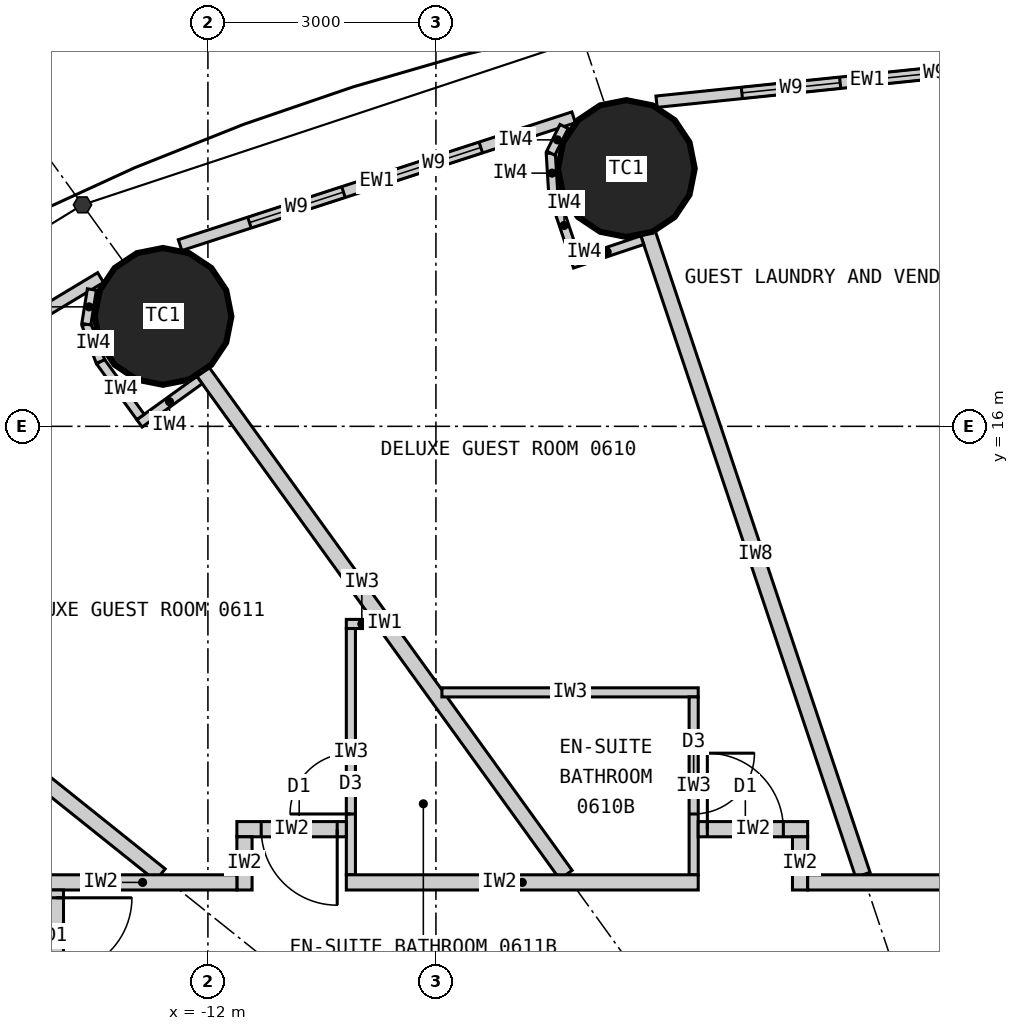
"""IFC4 building model, lengths in metres.
Left out: names, types, materials, properties, quantities, classifications, styles, units other than length and angle.
Written with IfcOpenShell. Run it as: python <this file> out.ifc"""

import sys

from ifc_helpers import new_model, si_unit, direction, frame, frame_2d, origin, origin_2d, place, context, subcontext, project, spatial, rectangle, circle, extrude, element, fill, save


model = new_model("IFC4")
c1 = context("Model", 3, precision=1e-05, world=origin(), true_north=direction((0.0, 1.0)))
c2 = subcontext(c1, "Body", "Model", "MODEL_VIEW")
j1 = project(units=[si_unit("LENGTHUNIT", "METRE"), si_unit("PLANEANGLEUNIT", "RADIAN")], contexts=[c1])
p1 = place(None, origin())
s1 = spatial("IfcSite", under=j1, at=p1, CompositionType="ELEMENT")
p2 = place(p1, origin())
s2 = spatial("IfcBuilding", under=s1, at=p2, CompositionType="ELEMENT")
p3 = place(p2, frame((0.0, 0.0, 32.7)))
s3 = spatial("IfcBuildingStorey", under=s2, at=p3, CompositionType="ELEMENT", Elevation=32.7)
for number, where, z_axis, x_axis in (
    (1, (-6.495, 19.391, 0.0), (0.0, 0.0, 1.0), (1.0, 0.0, 0.0)),
    (2, (-12.591, 17.447, 0.0), (0.0, 0.0, 1.0), (1.0, 0.0, 0.0)),
):
    element("IfcColumn", number, at=place(p3, frame(where, z_axis=z_axis, x_axis=x_axis)), inside=s3, PredefinedType="COLUMN", context=c2, shape_type="SweptSolid", body=[
        extrude(circle(Radius=0.9, at=origin_2d()), origin(), (0.0, 0.0, 1.0), 3.3),
    ])
p4 = place(p3, frame((-0.551, 20.843, 0.0), z_axis=(0.0, 0.0, 1.0), x_axis=(-0.994723735084, -0.102589915983, 0.0)))
e3 = element("IfcWall", 3, at=p4, inside=s3, PredefinedType="ELEMENTEDWALL", context=c2, shape_type="SweptSolid", body=[
    extrude(rectangle(XDim=5.576, YDim=0.15, at=frame_2d((2.788, 0.0))), origin(), (0.0, 0.0, 1.0), 3.12),
])
p5 = place(p4, frame((1.247, 0.0, 0.9)))
e4 = element("IfcOpeningElement", 4, at=p5, cuts=e3, PredefinedType="OPENING", context=c2, shape_type="SweptSolid", body=[
    extrude(rectangle(XDim=1.3, YDim=1.9, at=frame_2d((0.65, 0.95))), frame((0.0, 0.085, 0.0), z_axis=(0.0, -1.0, 0.0), x_axis=(1.0, 0.0, 0.0)), (0.0, 0.0, 1.0), 0.17),
])
p6 = place(p4, frame((3.147, 0.0, 0.9)))
e5 = element("IfcOpeningElement", 5, at=p6, cuts=e3, PredefinedType="OPENING", context=c2, shape_type="SweptSolid", body=[
    extrude(rectangle(XDim=1.3, YDim=1.9, at=frame_2d((0.65, 0.95))), frame((0.0, 0.085, 0.0), z_axis=(0.0, -1.0, 0.0), x_axis=(1.0, 0.0, 0.0)), (0.0, 0.0, 1.0), 0.17),
])
p7 = place(p3, frame((-7.188, 20.065, 0.0), z_axis=(0.0, 0.0, 1.0), x_axis=(-0.951138486029, -0.308764603532, 0.0)))
e6 = element("IfcWall", 6, at=p7, inside=s3, PredefinedType="ELEMENTEDWALL", context=c2, shape_type="SweptSolid", body=[
    extrude(rectangle(XDim=5.444, YDim=0.15, at=frame_2d((2.722, 0.0))), origin(), (0.0, 0.0, 1.0), 3.12),
])
p8 = place(p7, frame((1.284, 0.0, 0.9)))
e7 = element("IfcOpeningElement", 7, at=p8, cuts=e6, PredefinedType="OPENING", context=c2, shape_type="SweptSolid", body=[
    extrude(rectangle(XDim=1.3, YDim=1.9, at=frame_2d((0.65, 0.95))), frame((0.0, 0.085, 0.0), z_axis=(0.0, -1.0, 0.0), x_axis=(1.0, 0.0, 0.0)), (0.0, 0.0, 1.0), 0.17),
])
p9 = place(p7, frame((3.184, 0.0, 0.9)))
e8 = element("IfcOpeningElement", 8, at=p9, cuts=e6, PredefinedType="OPENING", context=c2, shape_type="SweptSolid", body=[
    extrude(rectangle(XDim=1.3, YDim=1.9, at=frame_2d((0.65, 0.95))), frame((0.0, 0.085, 0.0), z_axis=(0.0, -1.0, 0.0), x_axis=(1.0, 0.0, 0.0)), (0.0, 0.0, 1.0), 0.17),
])
p10 = place(p3, frame((-13.412, 17.957, 0.0), z_axis=(0.0, 0.0, 1.0), x_axis=(-0.856958191554, -0.515385931054, 0.0)))
e9 = element("IfcWall", 9, at=p10, inside=s3, PredefinedType="ELEMENTEDWALL", context=c2, shape_type="SweptSolid", body=[
    extrude(rectangle(XDim=5.201, YDim=0.15, at=frame_2d((2.601, 0.0))), origin(), (0.0, 0.0, 1.0), 3.12),
])
p11 = place(p10, frame((1.225, 0.0, 0.9)))
e10 = element("IfcOpeningElement", 10, at=p11, cuts=e9, PredefinedType="OPENING", context=c2, shape_type="SweptSolid", body=[
    extrude(rectangle(XDim=1.3, YDim=1.9, at=frame_2d((0.65, 0.95))), frame((0.0, 0.085, 0.0), z_axis=(0.0, -1.0, 0.0), x_axis=(1.0, 0.0, 0.0)), (0.0, 0.0, 1.0), 0.17),
])
p12 = place(p10, frame((3.125, 0.0, 0.9)))
e11 = element("IfcOpeningElement", 11, at=p12, cuts=e9, PredefinedType="OPENING", context=c2, shape_type="SweptSolid", body=[
    extrude(rectangle(XDim=1.3, YDim=1.9, at=frame_2d((0.65, 0.95))), frame((0.0, 0.085, 0.0), z_axis=(0.0, -1.0, 0.0), x_axis=(1.0, 0.0, 0.0)), (0.0, 0.0, 1.0), 0.17),
])
p13 = place(p3, frame((-3.383, 10.1, 0.0), z_axis=(0.0, 0.0, 1.0), x_axis=(-0.317593727596, 0.948226884344, 0.0)))
e12 = element("IfcWall", 12, at=p13, inside=s3, PredefinedType="PARTITIONING", context=c2, shape_type="SweptSolid", body=[
    extrude(rectangle(XDim=8.899, YDim=0.2, at=frame_2d((4.449, 0.0))), origin(), (0.0, 0.0, 1.0), 2.32),
])
p14 = place(p3, frame((-7.289, 10.1, 0.0), z_axis=(0.0, 0.0, 1.0), x_axis=(-0.585216319319, 0.810877216108, 0.0)))
e13 = element("IfcWall", 13, at=p14, inside=s3, PredefinedType="PARTITIONING", context=c2, shape_type="SweptSolid", body=[
    extrude(rectangle(XDim=8.16, YDim=0.2, at=frame_2d((4.08, 0.0))), origin(), (0.0, 0.0, 1.0), 2.32),
])
p15 = place(p3, frame((-12.625, 10.1, 0.0), z_axis=(0.0, 0.0, 1.0), x_axis=(-0.780872884676, 0.624689953479, 0.0)))
e14 = element("IfcWall", 14, at=p15, inside=s3, PredefinedType="PARTITIONING", context=c2, shape_type="SweptSolid", body=[
    extrude(rectangle(XDim=5.845, YDim=0.2, at=frame_2d((2.922, 0.0))), origin(), (0.0, 0.0, 1.0), 2.32),
])
p16 = place(p3, frame((-8.921, 12.5, 0.0), z_axis=(0.0, 0.0, 1.0), x_axis=(1.0, 0.0, 0.0)))
e15 = element("IfcWall", 15, at=p16, inside=s3, PredefinedType="PARTITIONING", context=c2, shape_type="SweptSolid", body=[
    extrude(rectangle(XDim=3.372, YDim=0.12, at=frame_2d((1.686, 0.0))), origin(), (0.0, 0.0, 1.0), 3.12),
])
p17 = place(p3, frame((-5.609, 10.1, 0.0), z_axis=(0.0, 0.0, 1.0), x_axis=(0.0, 1.0, 0.0)))
e16 = element("IfcWall", 16, at=p17, inside=s3, PredefinedType="PARTITIONING", context=c2, shape_type="SweptSolid", body=[
    extrude(rectangle(XDim=2.34, YDim=0.12, at=frame_2d((1.17, 0.0))), origin(), (0.0, 0.0, 1.0), 3.12),
])
p18 = place(p17, frame((0.8, 0.0, 0.0)))
e17 = element("IfcOpeningElement", 17, at=p18, cuts=e16, PredefinedType="OPENING", context=c2, shape_type="SweptSolid", body=[
    extrude(rectangle(XDim=0.8, YDim=2.1, at=frame_2d((0.4, 1.05))), frame((0.0, 0.07, 0.0), z_axis=(0.0, -1.0, 0.0), x_axis=(1.0, 0.0, 0.0)), (0.0, 0.0, 1.0), 0.14),
])
p19 = place(p3, frame((-9.771, 13.4, 0.0), z_axis=(0.0, 0.0, 1.0), x_axis=(-1.0, 0.0, 0.0)))
e18 = element("IfcWall", 18, at=p19, inside=s3, PredefinedType="PARTITIONING", context=c2, shape_type="SweptSolid", body=[
    extrude(rectangle(XDim=0.408, YDim=0.12, at=frame_2d((0.204, 0.0))), origin(), (0.0, 0.0, 1.0), 3.12),
])
p20 = place(p3, frame((-10.119, 10.1, 0.0), z_axis=(0.0, 0.0, 1.0), x_axis=(0.0, 1.0, 0.0)))
e19 = element("IfcWall", 19, at=p20, inside=s3, PredefinedType="PARTITIONING", context=c2, shape_type="SweptSolid", body=[
    extrude(rectangle(XDim=3.24, YDim=0.12, at=frame_2d((1.62, 0.0))), origin(), (0.0, 0.0, 1.0), 3.12),
])
p21 = place(p20, frame((0.8, 0.0, 0.0)))
e20 = element("IfcOpeningElement", 20, at=p21, cuts=e19, PredefinedType="OPENING", context=c2, shape_type="SweptSolid", body=[
    extrude(rectangle(XDim=0.8, YDim=2.1, at=frame_2d((0.4, 1.05))), frame((0.0, 0.07, 0.0), z_axis=(0.0, -1.0, 0.0), x_axis=(1.0, 0.0, 0.0)), (0.0, 0.0, 1.0), 0.14),
])
p22 = place(p3, frame((-5.549, 10.7, 0.0), z_axis=(0.0, 0.0, 1.0), x_axis=(1.0, 0.0, 0.0)))
e21 = element("IfcWall", 21, at=p22, inside=s3, PredefinedType="PARTITIONING", context=c2, shape_type="SweptSolid", body=[
    extrude(rectangle(XDim=1.44, YDim=0.2, at=frame_2d((0.72, 0.0))), origin(), (0.0, 0.0, 1.0), 3.12),
])
p23 = place(p22, frame((0.12, 0.0, 0.0)))
e22 = element("IfcOpeningElement", 22, at=p23, cuts=e21, PredefinedType="OPENING", context=c2, shape_type="SweptSolid", body=[
    extrude(rectangle(XDim=1.0, YDim=2.2, at=frame_2d((0.5, 1.1))), frame((0.0, 0.11, 0.0), z_axis=(0.0, -1.0, 0.0), x_axis=(1.0, 0.0, 0.0)), (0.0, 0.0, 1.0), 0.22),
])
p24 = place(p3, frame((-4.209, 9.9, 0.0), z_axis=(0.0, 0.0, 1.0), x_axis=(0.0, 1.0, 0.0)))
e23 = element("IfcWall", 23, at=p24, inside=s3, PredefinedType="PARTITIONING", context=c2, shape_type="SweptSolid", body=[
    extrude(rectangle(XDim=0.7, YDim=0.2, at=frame_2d((0.35, 0.0))), origin(), (0.0, 0.0, 1.0), 3.12),
])
p25 = place(p3, frame((-11.619, 10.7, 0.0), z_axis=(0.0, 0.0, 1.0), x_axis=(1.0, 0.0, 0.0)))
e24 = element("IfcWall", 24, at=p25, inside=s3, PredefinedType="PARTITIONING", context=c2, shape_type="SweptSolid", body=[
    extrude(rectangle(XDim=1.44, YDim=0.2, at=frame_2d((0.72, 0.0))), origin(), (0.0, 0.0, 1.0), 3.12),
])
p26 = place(p25, frame((0.32, 0.0, 0.0)))
e25 = element("IfcOpeningElement", 25, at=p26, cuts=e24, PredefinedType="OPENING", context=c2, shape_type="SweptSolid", body=[
    extrude(rectangle(XDim=1.0, YDim=2.2, at=frame_2d((0.5, 1.1))), frame((0.0, 0.11, 0.0), z_axis=(0.0, -1.0, 0.0), x_axis=(1.0, 0.0, 0.0)), (0.0, 0.0, 1.0), 0.22),
])
p27 = place(p3, frame((-11.519, 9.9, 0.0), z_axis=(0.0, 0.0, 1.0), x_axis=(0.0, 1.0, 0.0)))
e26 = element("IfcWall", 26, at=p27, inside=s3, PredefinedType="PARTITIONING", context=c2, shape_type="SweptSolid", body=[
    extrude(rectangle(XDim=0.7, YDim=0.2, at=frame_2d((0.35, 0.0))), origin(), (0.0, 0.0, 1.0), 3.12),
])
p28 = place(p3, frame((-14.1, 10.0, 0.0), z_axis=(0.0, 0.0, 1.0), x_axis=(1.0, 0.0, 0.0)))
e27 = element("IfcWall", 27, at=p28, inside=s3, PredefinedType="PARTITIONING", context=c2, shape_type="SweptSolid", body=[
    extrude(rectangle(XDim=2.481, YDim=0.2, at=frame_2d((1.24, 0.0))), origin(), (0.0, 0.0, 1.0), 3.12),
])
p29 = place(p3, frame((-10.179, 10.0, 0.0), z_axis=(0.0, 0.0, 1.0), x_axis=(1.0, 0.0, 0.0)))
e28 = element("IfcWall", 28, at=p29, inside=s3, PredefinedType="PARTITIONING", context=c2, shape_type="SweptSolid", body=[
    extrude(rectangle(XDim=4.63, YDim=0.2, at=frame_2d((2.315, 0.0))), origin(), (0.0, 0.0, 1.0), 3.12),
])
p30 = place(p3, frame((-4.109, 10.0, 0.0), z_axis=(0.0, 0.0, 1.0), x_axis=(1.0, 0.0, 0.0)))
e29 = element("IfcWall", 29, at=p30, inside=s3, PredefinedType="PARTITIONING", context=c2, shape_type="SweptSolid", body=[
    extrude(rectangle(XDim=4.312, YDim=0.2, at=frame_2d((2.156, 0.0))), origin(), (0.0, 0.0, 1.0), 3.12),
])
p31 = place(p30, frame((2.689, 0.0, 0.0)))
e30 = element("IfcOpeningElement", 30, at=p31, cuts=e29, PredefinedType="OPENING", context=c2, shape_type="SweptSolid", body=[
    extrude(rectangle(XDim=1.0, YDim=2.2, at=frame_2d((0.5, 1.1))), frame((0.0, 0.11, 0.0), z_axis=(0.0, -1.0, 0.0), x_axis=(1.0, 0.0, 0.0)), (0.0, 0.0, 1.0), 0.22),
])
p32 = place(p3, frame((-14.0, 9.9, 0.0), z_axis=(0.0, 0.0, 1.0), x_axis=(0.0, -1.0, 0.0)))
e31 = element("IfcWall", 31, at=p32, inside=s3, PredefinedType="PARTITIONING", context=c2, shape_type="SweptSolid", body=[
    extrude(rectangle(XDim=5.127, YDim=0.2, at=frame_2d((2.564, 0.0))), origin(), (0.0, 0.0, 1.0), 3.12),
])
p33 = place(p32, frame((0.103, 0.0, 0.0)))
e32 = element("IfcOpeningElement", 32, at=p33, cuts=e31, PredefinedType="OPENING", context=c2, shape_type="SweptSolid", body=[
    extrude(rectangle(XDim=1.0, YDim=2.2, at=frame_2d((0.5, 1.1))), frame((0.0, 0.11, 0.0), z_axis=(0.0, -1.0, 0.0), x_axis=(1.0, 0.0, 0.0)), (0.0, 0.0, 1.0), 0.22),
])
p34 = place(p3, frame((-6.285, 18.449, 0.0), z_axis=(0.0, 0.0, 1.0), x_axis=(-0.948281677008, -0.317430088446, 0.0)))
e33 = element("IfcWall", 33, at=p34, inside=s3, PredefinedType="PARTITIONING", context=c2, shape_type="SweptSolid", body=[
    extrude(rectangle(XDim=0.974, YDim=0.12, at=frame_2d((0.487, 0.0))), origin(), (0.0, 0.0, 1.0), 3.12),
])
p35 = place(p3, frame((-7.171, 18.216, 0.0), z_axis=(0.0, 0.0, 1.0), x_axis=(-0.317692409458, 0.94819382669, 0.0)))
e34 = element("IfcWall", 34, at=p35, inside=s3, PredefinedType="PARTITIONING", context=c2, shape_type="SweptSolid", body=[
    extrude(rectangle(XDim=0.9, YDim=0.12, at=frame_2d((0.45, 0.0))), origin(), (0.0, 0.0, 1.0), 3.12),
])
p36 = place(p3, frame((-7.457, 19.069, 0.0), z_axis=(0.0, 0.0, 1.0), x_axis=(-0.061365267648, 0.99811537606, 0.0)))
e35 = element("IfcWall", 35, at=p36, inside=s3, PredefinedType="PARTITIONING", context=c2, shape_type="SweptSolid", body=[
    extrude(rectangle(XDim=0.525, YDim=0.12, at=frame_2d((0.263, 0.0))), origin(), (0.0, 0.0, 1.0), 3.12),
])
p37 = place(p3, frame((-7.489, 19.593, 0.0), z_axis=(0.0, 0.0, 1.0), x_axis=(0.446218959337, 0.89492381817, 0.0)))
e36 = element("IfcWall", 36, at=p37, inside=s3, PredefinedType="PARTITIONING", context=c2, shape_type="SweptSolid", body=[
    extrude(rectangle(XDim=0.393, YDim=0.12, at=frame_2d((0.196, 0.0))), origin(), (0.0, 0.0, 1.0), 3.12),
])
p38 = place(p3, frame((-12.11, 16.609, 0.0), z_axis=(0.0, 0.0, 1.0), x_axis=(-0.810897160646, -0.585188683123, 0.0)))
e37 = element("IfcWall", 37, at=p38, inside=s3, PredefinedType="PARTITIONING", context=c2, shape_type="SweptSolid", body=[
    extrude(rectangle(XDim=0.975, YDim=0.12, at=frame_2d((0.487, 0.0))), origin(), (0.0, 0.0, 1.0), 3.12),
])
p39 = place(p3, frame((-12.887, 16.123, 0.0), z_axis=(0.0, 0.0, 1.0), x_axis=(-0.585054732094, 0.810993810367, 0.0)))
e38 = element("IfcWall", 38, at=p39, inside=s3, PredefinedType="PARTITIONING", context=c2, shape_type="SweptSolid", body=[
    extrude(rectangle(XDim=0.9, YDim=0.12, at=frame_2d((0.45, 0.0))), origin(), (0.0, 0.0, 1.0), 3.12),
])
p40 = place(p3, frame((-13.414, 16.853, 0.0), z_axis=(0.0, 0.0, 1.0), x_axis=(-0.355705277023, 0.934598178844, 0.0)))
e39 = element("IfcWall", 39, at=p40, inside=s3, PredefinedType="PARTITIONING", context=c2, shape_type="SweptSolid", body=[
    extrude(rectangle(XDim=0.525, YDim=0.12, at=frame_2d((0.263, 0.0))), origin(), (0.0, 0.0, 1.0), 3.12),
])
p41 = place(p3, frame((-13.6, 17.344, 0.0), z_axis=(0.0, 0.0, 1.0), x_axis=(0.15994604532, 0.987125758243, 0.0)))
e40 = element("IfcWall", 40, at=p41, inside=s3, PredefinedType="PARTITIONING", context=c2, shape_type="SweptSolid", body=[
    extrude(rectangle(XDim=0.462, YDim=0.12, at=frame_2d((0.231, 0.0))), origin(), (0.0, 0.0, 1.0), 3.12),
])
p42 = place(p5, origin())
e41 = element("IfcWindow", 41, at=p42, inside=s3, PartitioningType="SINGLE_PANEL", PredefinedType="WINDOW", context=c2, shape_type="SweptSolid", body=[
    extrude(rectangle(XDim=1.3, YDim=1.9, at=frame_2d((0.65, 0.95))), frame((0.0, 0.03, 0.0), z_axis=(0.0, -1.0, 0.0), x_axis=(1.0, 0.0, 0.0)), (0.0, 0.0, 1.0), 0.06),
])
fill(e4, e41)
p43 = place(p6, origin())
e42 = element("IfcWindow", 42, at=p43, inside=s3, PartitioningType="SINGLE_PANEL", PredefinedType="WINDOW", context=c2, shape_type="SweptSolid", body=[
    extrude(rectangle(XDim=1.3, YDim=1.9, at=frame_2d((0.65, 0.95))), frame((0.0, 0.03, 0.0), z_axis=(0.0, -1.0, 0.0), x_axis=(1.0, 0.0, 0.0)), (0.0, 0.0, 1.0), 0.06),
])
fill(e5, e42)
p44 = place(p8, origin())
e43 = element("IfcWindow", 43, at=p44, inside=s3, PartitioningType="SINGLE_PANEL", PredefinedType="WINDOW", context=c2, shape_type="SweptSolid", body=[
    extrude(rectangle(XDim=1.3, YDim=1.9, at=frame_2d((0.65, 0.95))), frame((0.0, 0.03, 0.0), z_axis=(0.0, -1.0, 0.0), x_axis=(1.0, 0.0, 0.0)), (0.0, 0.0, 1.0), 0.06),
])
fill(e7, e43)
p45 = place(p9, origin())
e44 = element("IfcWindow", 44, at=p45, inside=s3, PartitioningType="SINGLE_PANEL", PredefinedType="WINDOW", context=c2, shape_type="SweptSolid", body=[
    extrude(rectangle(XDim=1.3, YDim=1.9, at=frame_2d((0.65, 0.95))), frame((0.0, 0.03, 0.0), z_axis=(0.0, -1.0, 0.0), x_axis=(1.0, 0.0, 0.0)), (0.0, 0.0, 1.0), 0.06),
])
fill(e8, e44)
p46 = place(p18, origin())
e45 = element("IfcDoor", 45, at=p46, inside=s3, OperationType="SINGLE_SWING_RIGHT", PredefinedType="DOOR", context=c2, shape_type="SweptSolid", body=[
    extrude(rectangle(XDim=0.8, YDim=2.1, at=frame_2d((0.4, 1.05))), frame((0.0, 0.025, 0.0), z_axis=(0.0, -1.0, 0.0), x_axis=(1.0, 0.0, 0.0)), (0.0, 0.0, 1.0), 0.05),
])
fill(e17, e45)
p47 = place(p23, origin())
e46 = element("IfcDoor", 46, at=p47, inside=s3, OperationType="SINGLE_SWING_LEFT", PredefinedType="DOOR", context=c2, shape_type="SweptSolid", body=[
    extrude(rectangle(XDim=1.0, YDim=2.2, at=frame_2d((0.5, 1.1))), frame((0.0, 0.025, 0.0), z_axis=(0.0, -1.0, 0.0), x_axis=(1.0, 0.0, 0.0)), (0.0, 0.0, 1.0), 0.05),
])
fill(e22, e46)
p48 = place(p21, origin())
e47 = element("IfcDoor", 47, at=p48, inside=s3, OperationType="SINGLE_SWING_LEFT", PredefinedType="DOOR", context=c2, shape_type="SweptSolid", body=[
    extrude(rectangle(XDim=0.8, YDim=2.1, at=frame_2d((0.4, 1.05))), frame((0.0, 0.025, 0.0), z_axis=(0.0, -1.0, 0.0), x_axis=(1.0, 0.0, 0.0)), (0.0, 0.0, 1.0), 0.05),
])
fill(e20, e47)
p49 = place(p26, origin())
e48 = element("IfcDoor", 48, at=p49, inside=s3, OperationType="SINGLE_SWING_RIGHT", PredefinedType="DOOR", context=c2, shape_type="SweptSolid", body=[
    extrude(rectangle(XDim=1.0, YDim=2.2, at=frame_2d((0.5, 1.1))), frame((0.0, 0.025, 0.0), z_axis=(0.0, -1.0, 0.0), x_axis=(1.0, 0.0, 0.0)), (0.0, 0.0, 1.0), 0.05),
])
fill(e25, e48)
p50 = place(p33, origin())
e49 = element("IfcDoor", 49, at=p50, inside=s3, OperationType="SINGLE_SWING_LEFT", PredefinedType="DOOR", context=c2, shape_type="SweptSolid", body=[
    extrude(rectangle(XDim=1.0, YDim=2.2, at=frame_2d((0.5, 1.1))), frame((0.0, 0.025, 0.0), z_axis=(0.0, -1.0, 0.0), x_axis=(1.0, 0.0, 0.0)), (0.0, 0.0, 1.0), 0.05),
])
fill(e32, e49)
save(model, sys.argv[1])
